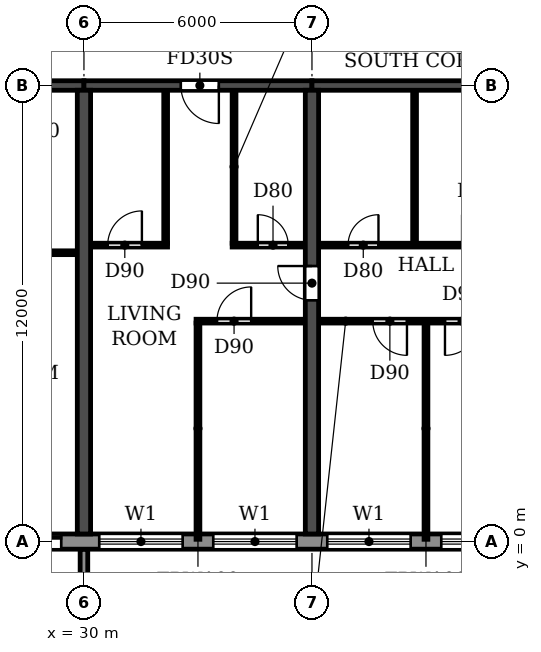
"""IFC4 building model, lengths in metres.
Left out: names, types, materials, properties, quantities, classifications, styles, units other than length and angle.
Written with IfcOpenShell. Run it as: python <this file> out.ifc"""

import sys

from ifc_helpers import new_model, si_unit, direction, frame, frame_2d, origin, place, context, subcontext, project, spatial, polyline, rectangle, outline, extrude, source, transform, mapped, element, fill, save


model = new_model("IFC4")
c1 = context("Model", 3, precision=1e-05, world=origin(), true_north=direction((0.0, 1.0)))
c2 = subcontext(c1, "Body", "Model", "MODEL_VIEW")
j1 = project(units=[si_unit("LENGTHUNIT", "METRE"), si_unit("PLANEANGLEUNIT", "RADIAN")], contexts=[c1])
p1 = place(None, origin())
s1 = spatial("IfcSite", under=j1, at=p1, CompositionType="ELEMENT")
p2 = place(p1, origin())
s2 = spatial("IfcBuilding", under=s1, at=p2, CompositionType="ELEMENT")
p3 = place(p2, frame((0.0, 0.0, 112.5)))
s3 = spatial("IfcBuildingStorey", under=s2, at=p3, CompositionType="ELEMENT", Elevation=112.5)
p4 = place(p3, frame((30.0, 0.2, 0.0), z_axis=(0.0, 0.0, 1.0), x_axis=(0.0, 1.0, 0.0)))
e1 = element("IfcWall", 1, at=p4, inside=s3, PredefinedType="SHEAR", context=c2, shape_type="SweptSolid", body=[
    extrude(rectangle(XDim=11.675, YDim=0.35, at=frame_2d((5.837, 0.0))), origin(), (0.0, 0.0, 1.0), 2.95),
])
p5 = place(p3, frame((36.0, 0.2, 0.0), z_axis=(0.0, 0.0, 1.0), x_axis=(0.0, 1.0, 0.0)))
e2 = element("IfcWall", 2, at=p5, inside=s3, PredefinedType="SHEAR", context=c2, shape_type="SweptSolid", body=[
    extrude(rectangle(XDim=11.675, YDim=0.35, at=frame_2d((5.837, 0.0))), origin(), (0.0, 0.0, 1.0), 2.95),
])
p6 = place(p5, frame((6.15, 0.0, 0.0)))
e3 = element("IfcOpeningElement", 3, at=p6, cuts=e2, PredefinedType="OPENING", context=c2, shape_type="SweptSolid", body=[
    extrude(rectangle(XDim=0.9, YDim=2.1, at=frame_2d((0.45, 1.05))), frame((0.0, 0.185, 0.0), z_axis=(0.0, -1.0, 0.0), x_axis=(1.0, 0.0, 0.0)), (0.0, 0.0, 1.0), 0.37),
])
p7 = place(p3, frame((24.0, 12.0, 0.0), z_axis=(0.0, 0.0, 1.0), x_axis=(1.0, 0.0, 0.0)))
e4 = element("IfcWall", 4, at=p7, inside=s3, PredefinedType="SHEAR", context=c2, shape_type="SweptSolid", body=[
    extrude(rectangle(XDim=6.0, YDim=0.25, at=frame_2d((3.0, 0.0))), origin(), (0.0, 0.0, 1.0), 2.35),
])
p8 = place(p7, frame((2.45, 0.0, 0.0)))
e5 = element("IfcOpeningElement", 5, at=p8, cuts=e4, PredefinedType="OPENING", context=c2, shape_type="SweptSolid", body=[
    extrude(rectangle(XDim=1.0, YDim=2.1, at=frame_2d((0.5, 1.05))), frame((0.0, 0.135, 0.0), z_axis=(0.0, -1.0, 0.0), x_axis=(1.0, 0.0, 0.0)), (0.0, 0.0, 1.0), 0.27),
])
p9 = place(p3, frame((30.0, 12.0, 0.0), z_axis=(0.0, 0.0, 1.0), x_axis=(1.0, 0.0, 0.0)))
e6 = element("IfcWall", 6, at=p9, inside=s3, PredefinedType="SHEAR", context=c2, shape_type="SweptSolid", body=[
    extrude(rectangle(XDim=6.0, YDim=0.25, at=frame_2d((3.0, 0.0))), origin(), (0.0, 0.0, 1.0), 2.35),
])
p10 = place(p9, frame((2.55, 0.0, 0.0)))
e7 = element("IfcOpeningElement", 7, at=p10, cuts=e6, PredefinedType="OPENING", context=c2, shape_type="SweptSolid", body=[
    extrude(rectangle(XDim=1.0, YDim=2.1, at=frame_2d((0.5, 1.05))), frame((0.0, 0.135, 0.0), z_axis=(0.0, -1.0, 0.0), x_axis=(1.0, 0.0, 0.0)), (0.0, 0.0, 1.0), 0.27),
])
p11 = place(p3, frame((36.0, 12.0, 0.0), z_axis=(0.0, 0.0, 1.0), x_axis=(1.0, 0.0, 0.0)))
e8 = element("IfcWall", 8, at=p11, inside=s3, PredefinedType="SHEAR", context=c2, shape_type="SweptSolid", body=[
    extrude(rectangle(XDim=6.0, YDim=0.25, at=frame_2d((3.0, 0.0))), origin(), (0.0, 0.0, 1.0), 2.35),
])
p12 = place(p3, frame((16.683, 0.0, 0.0), z_axis=(0.0, 0.0, 1.0), x_axis=(1.0, 0.0, 0.0)))
e9 = element("IfcWall", 9, at=p12, inside=s3, PredefinedType="STANDARD", context=c2, shape_type="SweptSolid", body=[
    extrude(rectangle(XDim=68.634, YDim=0.4, at=frame_2d((34.317, 0.0))), origin(), (0.0, 0.0, 1.0), 2.95),
])
p13 = place(p12, frame((1.717, 0.0, 0.9)))
e10 = element("IfcOpeningElement", 10, at=p13, cuts=e9, PredefinedType="OPENING", context=c2, shape_type="SweptSolid", body=[
    extrude(rectangle(XDim=2.2, YDim=1.5, at=frame_2d((1.1, 0.75))), frame((0.0, 0.21, 0.0), z_axis=(0.0, -1.0, 0.0), x_axis=(1.0, 0.0, 0.0)), (0.0, 0.0, 1.0), 0.42),
])
p14 = place(p12, frame((4.717, 0.0, 0.9)))
e11 = element("IfcOpeningElement", 11, at=p14, cuts=e9, PredefinedType="OPENING", context=c2, shape_type="SweptSolid", body=[
    extrude(rectangle(XDim=2.2, YDim=1.5, at=frame_2d((1.1, 0.75))), frame((0.0, 0.21, 0.0), z_axis=(0.0, -1.0, 0.0), x_axis=(1.0, 0.0, 0.0)), (0.0, 0.0, 1.0), 0.42),
])
p15 = place(p12, frame((7.717, 0.0, 0.9)))
e12 = element("IfcOpeningElement", 12, at=p15, cuts=e9, PredefinedType="OPENING", context=c2, shape_type="SweptSolid", body=[
    extrude(rectangle(XDim=2.2, YDim=1.5, at=frame_2d((1.1, 0.75))), frame((0.0, 0.21, 0.0), z_axis=(0.0, -1.0, 0.0), x_axis=(1.0, 0.0, 0.0)), (0.0, 0.0, 1.0), 0.42),
])
p16 = place(p12, frame((10.917, 0.0, 0.0)))
e13 = element("IfcOpeningElement", 13, at=p16, cuts=e9, PredefinedType="OPENING", context=c2, shape_type="SweptSolid", body=[
    extrude(rectangle(XDim=1.8, YDim=2.4, at=frame_2d((0.9, 1.2))), frame((0.0, 0.21, 0.0), z_axis=(0.0, -1.0, 0.0), x_axis=(1.0, 0.0, 0.0)), (0.0, 0.0, 1.0), 0.42),
])
p17 = place(p12, frame((13.717, 0.0, 0.9)))
e14 = element("IfcOpeningElement", 14, at=p17, cuts=e9, PredefinedType="OPENING", context=c2, shape_type="SweptSolid", body=[
    extrude(rectangle(XDim=2.2, YDim=1.5, at=frame_2d((1.1, 0.75))), frame((0.0, 0.21, 0.0), z_axis=(0.0, -1.0, 0.0), x_axis=(1.0, 0.0, 0.0)), (0.0, 0.0, 1.0), 0.42),
])
p18 = place(p12, frame((16.717, 0.0, 0.9)))
e15 = element("IfcOpeningElement", 15, at=p18, cuts=e9, PredefinedType="OPENING", context=c2, shape_type="SweptSolid", body=[
    extrude(rectangle(XDim=2.2, YDim=1.5, at=frame_2d((1.1, 0.75))), frame((0.0, 0.21, 0.0), z_axis=(0.0, -1.0, 0.0), x_axis=(1.0, 0.0, 0.0)), (0.0, 0.0, 1.0), 0.42),
])
p19 = place(p12, frame((19.717, 0.0, 0.9)))
e16 = element("IfcOpeningElement", 16, at=p19, cuts=e9, PredefinedType="OPENING", context=c2, shape_type="SweptSolid", body=[
    extrude(rectangle(XDim=2.2, YDim=1.5, at=frame_2d((1.1, 0.75))), frame((0.0, 0.21, 0.0), z_axis=(0.0, -1.0, 0.0), x_axis=(1.0, 0.0, 0.0)), (0.0, 0.0, 1.0), 0.42),
])
p20 = place(p12, frame((22.717, 0.0, 0.9)))
e17 = element("IfcOpeningElement", 17, at=p20, cuts=e9, PredefinedType="OPENING", context=c2, shape_type="SweptSolid", body=[
    extrude(rectangle(XDim=2.2, YDim=1.5, at=frame_2d((1.1, 0.75))), frame((0.0, 0.21, 0.0), z_axis=(0.0, -1.0, 0.0), x_axis=(1.0, 0.0, 0.0)), (0.0, 0.0, 1.0), 0.42),
])
p21 = place(p12, frame((25.717, 0.0, 0.9)))
e18 = element("IfcOpeningElement", 18, at=p21, cuts=e9, PredefinedType="OPENING", context=c2, shape_type="SweptSolid", body=[
    extrude(rectangle(XDim=2.2, YDim=1.5, at=frame_2d((1.1, 0.75))), frame((0.0, 0.21, 0.0), z_axis=(0.0, -1.0, 0.0), x_axis=(1.0, 0.0, 0.0)), (0.0, 0.0, 1.0), 0.42),
])
p22 = place(p12, frame((28.717, 0.0, 0.9)))
e19 = element("IfcOpeningElement", 19, at=p22, cuts=e9, PredefinedType="OPENING", context=c2, shape_type="SweptSolid", body=[
    extrude(rectangle(XDim=2.2, YDim=1.5, at=frame_2d((1.1, 0.75))), frame((0.0, 0.21, 0.0), z_axis=(0.0, -1.0, 0.0), x_axis=(1.0, 0.0, 0.0)), (0.0, 0.0, 1.0), 0.42),
])
p23 = place(p12, frame((31.917, 0.0, 0.0)))
e20 = element("IfcOpeningElement", 20, at=p23, cuts=e9, PredefinedType="OPENING", context=c2, shape_type="SweptSolid", body=[
    extrude(rectangle(XDim=1.8, YDim=2.4, at=frame_2d((0.9, 1.2))), frame((0.0, 0.21, 0.0), z_axis=(0.0, -1.0, 0.0), x_axis=(1.0, 0.0, 0.0)), (0.0, 0.0, 1.0), 0.42),
])
p24 = place(p12, frame((34.717, 0.0, 0.9)))
e21 = element("IfcOpeningElement", 21, at=p24, cuts=e9, PredefinedType="OPENING", context=c2, shape_type="SweptSolid", body=[
    extrude(rectangle(XDim=2.2, YDim=1.5, at=frame_2d((1.1, 0.75))), frame((0.0, 0.21, 0.0), z_axis=(0.0, -1.0, 0.0), x_axis=(1.0, 0.0, 0.0)), (0.0, 0.0, 1.0), 0.42),
])
p25 = place(p12, frame((37.717, 0.0, 0.9)))
e22 = element("IfcOpeningElement", 22, at=p25, cuts=e9, PredefinedType="OPENING", context=c2, shape_type="SweptSolid", body=[
    extrude(rectangle(XDim=2.2, YDim=1.5, at=frame_2d((1.1, 0.75))), frame((0.0, 0.21, 0.0), z_axis=(0.0, -1.0, 0.0), x_axis=(1.0, 0.0, 0.0)), (0.0, 0.0, 1.0), 0.42),
])
p26 = place(p12, frame((40.717, 0.0, 0.9)))
e23 = element("IfcOpeningElement", 23, at=p26, cuts=e9, PredefinedType="OPENING", context=c2, shape_type="SweptSolid", body=[
    extrude(rectangle(XDim=2.2, YDim=1.5, at=frame_2d((1.1, 0.75))), frame((0.0, 0.21, 0.0), z_axis=(0.0, -1.0, 0.0), x_axis=(1.0, 0.0, 0.0)), (0.0, 0.0, 1.0), 0.42),
])
p27 = place(p12, frame((43.717, 0.0, 0.9)))
e24 = element("IfcOpeningElement", 24, at=p27, cuts=e9, PredefinedType="OPENING", context=c2, shape_type="SweptSolid", body=[
    extrude(rectangle(XDim=2.2, YDim=1.5, at=frame_2d((1.1, 0.75))), frame((0.0, 0.21, 0.0), z_axis=(0.0, -1.0, 0.0), x_axis=(1.0, 0.0, 0.0)), (0.0, 0.0, 1.0), 0.42),
])
p28 = place(p12, frame((46.917, 0.0, 0.0)))
e25 = element("IfcOpeningElement", 25, at=p28, cuts=e9, PredefinedType="OPENING", context=c2, shape_type="SweptSolid", body=[
    extrude(rectangle(XDim=1.8, YDim=2.4, at=frame_2d((0.9, 1.2))), frame((0.0, 0.21, 0.0), z_axis=(0.0, -1.0, 0.0), x_axis=(1.0, 0.0, 0.0)), (0.0, 0.0, 1.0), 0.42),
])
p29 = place(p12, frame((49.717, 0.0, 0.9)))
e26 = element("IfcOpeningElement", 26, at=p29, cuts=e9, PredefinedType="OPENING", context=c2, shape_type="SweptSolid", body=[
    extrude(rectangle(XDim=2.2, YDim=1.5, at=frame_2d((1.1, 0.75))), frame((0.0, 0.21, 0.0), z_axis=(0.0, -1.0, 0.0), x_axis=(1.0, 0.0, 0.0)), (0.0, 0.0, 1.0), 0.42),
])
p30 = place(p12, frame((52.717, 0.0, 0.9)))
e27 = element("IfcOpeningElement", 27, at=p30, cuts=e9, PredefinedType="OPENING", context=c2, shape_type="SweptSolid", body=[
    extrude(rectangle(XDim=2.2, YDim=1.5, at=frame_2d((1.1, 0.75))), frame((0.0, 0.21, 0.0), z_axis=(0.0, -1.0, 0.0), x_axis=(1.0, 0.0, 0.0)), (0.0, 0.0, 1.0), 0.42),
])
p31 = place(p12, frame((55.717, 0.0, 0.9)))
e28 = element("IfcOpeningElement", 28, at=p31, cuts=e9, PredefinedType="OPENING", context=c2, shape_type="SweptSolid", body=[
    extrude(rectangle(XDim=2.2, YDim=1.5, at=frame_2d((1.1, 0.75))), frame((0.0, 0.21, 0.0), z_axis=(0.0, -1.0, 0.0), x_axis=(1.0, 0.0, 0.0)), (0.0, 0.0, 1.0), 0.42),
])
p32 = place(p12, frame((58.717, 0.0, 0.9)))
e29 = element("IfcOpeningElement", 29, at=p32, cuts=e9, PredefinedType="OPENING", context=c2, shape_type="SweptSolid", body=[
    extrude(rectangle(XDim=2.2, YDim=1.5, at=frame_2d((1.1, 0.75))), frame((0.0, 0.21, 0.0), z_axis=(0.0, -1.0, 0.0), x_axis=(1.0, 0.0, 0.0)), (0.0, 0.0, 1.0), 0.42),
])
p33 = place(p12, frame((61.717, 0.0, 0.9)))
e30 = element("IfcOpeningElement", 30, at=p33, cuts=e9, PredefinedType="OPENING", context=c2, shape_type="SweptSolid", body=[
    extrude(rectangle(XDim=2.2, YDim=1.5, at=frame_2d((1.1, 0.75))), frame((0.0, 0.21, 0.0), z_axis=(0.0, -1.0, 0.0), x_axis=(1.0, 0.0, 0.0)), (0.0, 0.0, 1.0), 0.42),
])
p34 = place(p12, frame((64.717, 0.0, 0.9)))
e31 = element("IfcOpeningElement", 31, at=p34, cuts=e9, PredefinedType="OPENING", context=c2, shape_type="SweptSolid", body=[
    extrude(rectangle(XDim=2.2, YDim=1.5, at=frame_2d((1.1, 0.75))), frame((0.0, 0.21, 0.0), z_axis=(0.0, -1.0, 0.0), x_axis=(1.0, 0.0, 0.0)), (0.0, 0.0, 1.0), 0.42),
])
m1 = source(origin(), c2, "Body", "SweptSolid", [
    extrude(outline(polyline([(0.0, 0.0), (0.2, 0.0), (0.2, 1.65), (0.0, 1.65), (0.0, 0.0)])), origin(), (0.0, 0.0, 1.0), 3.1),
])
p35 = place(p3, frame((29.9, -1.85, 0.0)))
e32 = element("IfcWall", 32, at=p35, inside=s3, PredefinedType="STANDARD", context=c2, shape_type="MappedRepresentation", body=[
    mapped(m1, transform((0.0, 0.0, 0.0))),
])
p36 = place(p3, frame((32.95, 5.8, 0.0), z_axis=(0.0, 0.0, 1.0), x_axis=(1.0, 0.0, 0.0)))
e33 = element("IfcWall", 33, at=p36, inside=s3, PredefinedType="PARTITIONING", context=c2, shape_type="SweptSolid", body=[
    extrude(rectangle(XDim=2.865, YDim=0.1, at=frame_2d((1.433, 0.0))), origin(), (0.0, 0.0, 1.0), 2.95),
])
p37 = place(p36, frame((0.55, 0.0, 0.0)))
e34 = element("IfcOpeningElement", 34, at=p37, cuts=e33, PredefinedType="OPENING", context=c2, shape_type="SweptSolid", body=[
    extrude(rectangle(XDim=0.9, YDim=2.1, at=frame_2d((0.45, 1.05))), frame((0.0, 0.06, 0.0), z_axis=(0.0, -1.0, 0.0), x_axis=(1.0, 0.0, 0.0)), (0.0, 0.0, 1.0), 0.12),
])
p38 = place(p3, frame((36.185, 5.8, 0.0), z_axis=(0.0, 0.0, 1.0), x_axis=(1.0, 0.0, 0.0)))
e35 = element("IfcWall", 35, at=p38, inside=s3, PredefinedType="PARTITIONING", context=c2, shape_type="SweptSolid", body=[
    extrude(rectangle(XDim=5.63, YDim=0.1, at=frame_2d((2.815, 0.0))), origin(), (0.0, 0.0, 1.0), 2.95),
])
p39 = place(p38, frame((1.415, 0.0, 0.0)))
e36 = element("IfcOpeningElement", 36, at=p39, cuts=e35, PredefinedType="OPENING", context=c2, shape_type="SweptSolid", body=[
    extrude(rectangle(XDim=0.9, YDim=2.1, at=frame_2d((0.45, 1.05))), frame((0.0, 0.06, 0.0), z_axis=(0.0, -1.0, 0.0), x_axis=(1.0, 0.0, 0.0)), (0.0, 0.0, 1.0), 0.12),
])
p40 = place(p38, frame((3.315, 0.0, 0.0)))
e37 = element("IfcOpeningElement", 37, at=p40, cuts=e35, PredefinedType="OPENING", context=c2, shape_type="SweptSolid", body=[
    extrude(rectangle(XDim=0.9, YDim=2.1, at=frame_2d((0.45, 1.05))), frame((0.0, 0.06, 0.0), z_axis=(0.0, -1.0, 0.0), x_axis=(1.0, 0.0, 0.0)), (0.0, 0.0, 1.0), 0.12),
])
p41 = place(p3, frame((27.8, 7.6, 0.0), z_axis=(0.0, 0.0, 1.0), x_axis=(1.0, 0.0, 0.0)))
e38 = element("IfcWall", 38, at=p41, inside=s3, PredefinedType="PARTITIONING", context=c2, shape_type="SweptSolid", body=[
    extrude(rectangle(XDim=2.015, YDim=0.1, at=frame_2d((1.007, 0.0))), origin(), (0.0, 0.0, 1.0), 2.95),
])
p42 = place(p3, frame((30.185, 7.8, 0.0), z_axis=(0.0, 0.0, 1.0), x_axis=(1.0, 0.0, 0.0)))
e39 = element("IfcWall", 39, at=p42, inside=s3, PredefinedType="PARTITIONING", context=c2, shape_type="SweptSolid", body=[
    extrude(rectangle(XDim=2.015, YDim=0.1, at=frame_2d((1.007, 0.0))), origin(), (0.0, 0.0, 1.0), 2.95),
])
p43 = place(p42, frame((0.44, 0.0, 0.0)))
e40 = element("IfcOpeningElement", 40, at=p43, cuts=e39, PredefinedType="OPENING", context=c2, shape_type="SweptSolid", body=[
    extrude(rectangle(XDim=0.9, YDim=2.1, at=frame_2d((0.45, 1.05))), frame((0.0, 0.06, 0.0), z_axis=(0.0, -1.0, 0.0), x_axis=(1.0, 0.0, 0.0)), (0.0, 0.0, 1.0), 0.12),
])
p44 = place(p3, frame((33.9, 7.8, 0.0), z_axis=(0.0, 0.0, 1.0), x_axis=(1.0, 0.0, 0.0)))
e41 = element("IfcWall", 41, at=p44, inside=s3, PredefinedType="PARTITIONING", context=c2, shape_type="SweptSolid", body=[
    extrude(rectangle(XDim=1.915, YDim=0.1, at=frame_2d((0.958, 0.0))), origin(), (0.0, 0.0, 1.0), 2.95),
])
p45 = place(p44, frame((0.675, 0.0, 0.0)))
e42 = element("IfcOpeningElement", 42, at=p45, cuts=e41, PredefinedType="OPENING", context=c2, shape_type="SweptSolid", body=[
    extrude(rectangle(XDim=0.8, YDim=2.1, at=frame_2d((0.4, 1.05))), frame((0.0, 0.06, 0.0), z_axis=(0.0, -1.0, 0.0), x_axis=(1.0, 0.0, 0.0)), (0.0, 0.0, 1.0), 0.12),
])
p46 = place(p3, frame((36.185, 7.8, 0.0), z_axis=(0.0, 0.0, 1.0), x_axis=(1.0, 0.0, 0.0)))
e43 = element("IfcWall", 43, at=p46, inside=s3, PredefinedType="PARTITIONING", context=c2, shape_type="SweptSolid", body=[
    extrude(rectangle(XDim=5.63, YDim=0.1, at=frame_2d((2.815, 0.0))), origin(), (0.0, 0.0, 1.0), 2.95),
])
p47 = place(p46, frame((0.765, 0.0, 0.0)))
e44 = element("IfcOpeningElement", 44, at=p47, cuts=e43, PredefinedType="OPENING", context=c2, shape_type="SweptSolid", body=[
    extrude(rectangle(XDim=0.8, YDim=2.1, at=frame_2d((0.4, 1.05))), frame((0.0, 0.06, 0.0), z_axis=(0.0, -1.0, 0.0), x_axis=(1.0, 0.0, 0.0)), (0.0, 0.0, 1.0), 0.12),
])
p48 = place(p46, frame((3.765, 0.0, 0.0)))
e45 = element("IfcOpeningElement", 45, at=p48, cuts=e43, PredefinedType="OPENING", context=c2, shape_type="SweptSolid", body=[
    extrude(rectangle(XDim=0.8, YDim=2.1, at=frame_2d((0.4, 1.05))), frame((0.0, 0.06, 0.0), z_axis=(0.0, -1.0, 0.0), x_axis=(1.0, 0.0, 0.0)), (0.0, 0.0, 1.0), 0.12),
])
p49 = place(p3, frame((32.15, 7.85, 0.0), z_axis=(0.0, 0.0, 1.0), x_axis=(0.0, 1.0, 0.0)))
e46 = element("IfcWall", 46, at=p49, inside=s3, PredefinedType="PARTITIONING", context=c2, shape_type="SweptSolid", body=[
    extrude(rectangle(XDim=4.015, YDim=0.1, at=frame_2d((2.007, 0.0))), origin(), (0.0, 0.0, 1.0), 2.95),
])
p50 = place(p3, frame((33.0, 0.06, 0.0), z_axis=(0.0, 0.0, 1.0), x_axis=(0.0, 1.0, 0.0)))
e47 = element("IfcWall", 47, at=p50, inside=s3, PredefinedType="PARTITIONING", context=c2, shape_type="SweptSolid", body=[
    extrude(rectangle(XDim=5.69, YDim=0.1, at=frame_2d((2.845, 0.0))), origin(), (0.0, 0.0, 1.0), 2.95),
])
for number, where, z_axis, x_axis in (
    (48, (33.95, 7.85, 0.0), (0.0, 0.0, 1.0), (0.0, 1.0, 0.0)),
    (49, (38.7, 7.85, 0.0), (0.0, 0.0, 1.0), (0.0, 1.0, 0.0)),
):
    element("IfcWall", number, at=place(p3, frame(where, z_axis=z_axis, x_axis=x_axis)), inside=s3, PredefinedType="PARTITIONING", context=c2, shape_type="SweptSolid", body=[
        extrude(rectangle(XDim=4.015, YDim=0.1, at=frame_2d((2.007, 0.0))), origin(), (0.0, 0.0, 1.0), 2.95),
    ])
p51 = place(p3, frame((39.0, 0.06, 0.0), z_axis=(0.0, 0.0, 1.0), x_axis=(0.0, 1.0, 0.0)))
e50 = element("IfcWall", 50, at=p51, inside=s3, PredefinedType="PARTITIONING", context=c2, shape_type="SweptSolid", body=[
    extrude(rectangle(XDim=5.69, YDim=0.1, at=frame_2d((2.845, 0.0))), origin(), (0.0, 0.0, 1.0), 2.95),
])
p52 = place(p16, origin())
e51 = element("IfcDoor", 51, at=p52, inside=s3, OperationType="DOUBLE_DOOR_SLIDING", PredefinedType="DOOR", context=c2, shape_type="SweptSolid", body=[
    extrude(rectangle(XDim=1.8, YDim=2.4, at=frame_2d((0.9, 1.2))), frame((0.0, 0.025, 0.0), z_axis=(0.0, -1.0, 0.0), x_axis=(1.0, 0.0, 0.0)), (0.0, 0.0, 1.0), 0.05),
])
fill(e13, e51)
p53 = place(p17, origin())
e52 = element("IfcWindow", 52, at=p53, inside=s3, PartitioningType="DOUBLE_PANEL_HORIZONTAL", PredefinedType="WINDOW", context=c2, shape_type="SweptSolid", body=[
    extrude(rectangle(XDim=2.2, YDim=1.5, at=frame_2d((1.1, 0.75))), frame((0.0, 0.03, 0.0), z_axis=(0.0, -1.0, 0.0), x_axis=(1.0, 0.0, 0.0)), (0.0, 0.0, 1.0), 0.06),
])
fill(e14, e52)
p54 = place(p18, origin())
e53 = element("IfcWindow", 53, at=p54, inside=s3, PartitioningType="DOUBLE_PANEL_HORIZONTAL", PredefinedType="WINDOW", context=c2, shape_type="SweptSolid", body=[
    extrude(rectangle(XDim=2.2, YDim=1.5, at=frame_2d((1.1, 0.75))), frame((0.0, 0.03, 0.0), z_axis=(0.0, -1.0, 0.0), x_axis=(1.0, 0.0, 0.0)), (0.0, 0.0, 1.0), 0.06),
])
fill(e15, e53)
p55 = place(p19, origin())
e54 = element("IfcWindow", 54, at=p55, inside=s3, PartitioningType="DOUBLE_PANEL_HORIZONTAL", PredefinedType="WINDOW", context=c2, shape_type="SweptSolid", body=[
    extrude(rectangle(XDim=2.2, YDim=1.5, at=frame_2d((1.1, 0.75))), frame((0.0, 0.03, 0.0), z_axis=(0.0, -1.0, 0.0), x_axis=(1.0, 0.0, 0.0)), (0.0, 0.0, 1.0), 0.06),
])
fill(e16, e54)
p56 = place(p20, origin())
e55 = element("IfcWindow", 55, at=p56, inside=s3, PartitioningType="DOUBLE_PANEL_HORIZONTAL", PredefinedType="WINDOW", context=c2, shape_type="SweptSolid", body=[
    extrude(rectangle(XDim=2.2, YDim=1.5, at=frame_2d((1.1, 0.75))), frame((0.0, 0.03, 0.0), z_axis=(0.0, -1.0, 0.0), x_axis=(1.0, 0.0, 0.0)), (0.0, 0.0, 1.0), 0.06),
])
fill(e17, e55)
p57 = place(p47, origin())
e56 = element("IfcDoor", 56, at=p57, inside=s3, OperationType="SINGLE_SWING_RIGHT", PredefinedType="DOOR", context=c2, shape_type="SweptSolid", body=[
    extrude(rectangle(XDim=0.8, YDim=2.1, at=frame_2d((0.4, 1.05))), frame((0.0, 0.025, 0.0), z_axis=(0.0, -1.0, 0.0), x_axis=(1.0, 0.0, 0.0)), (0.0, 0.0, 1.0), 0.05),
])
fill(e44, e56)
p58 = place(p39, frame((0.9, 0.0, 0.0), z_axis=(0.0, 0.0, 1.0), x_axis=(-1.0, 0.0, 0.0)))
e57 = element("IfcDoor", 57, at=p58, inside=s3, OperationType="SINGLE_SWING_LEFT", PredefinedType="DOOR", context=c2, shape_type="SweptSolid", body=[
    extrude(rectangle(XDim=0.9, YDim=2.1, at=frame_2d((0.45, 1.05))), frame((0.0, 0.025, 0.0), z_axis=(0.0, -1.0, 0.0), x_axis=(1.0, 0.0, 0.0)), (0.0, 0.0, 1.0), 0.05),
])
fill(e36, e57)
p59 = place(p40, frame((0.9, 0.0, 0.0), z_axis=(0.0, 0.0, 1.0), x_axis=(-1.0, 0.0, 0.0)))
e58 = element("IfcDoor", 58, at=p59, inside=s3, OperationType="SINGLE_SWING_RIGHT", PredefinedType="DOOR", context=c2, shape_type="SweptSolid", body=[
    extrude(rectangle(XDim=0.9, YDim=2.1, at=frame_2d((0.45, 1.05))), frame((0.0, 0.025, 0.0), z_axis=(0.0, -1.0, 0.0), x_axis=(1.0, 0.0, 0.0)), (0.0, 0.0, 1.0), 0.05),
])
fill(e37, e58)
p60 = place(p48, origin())
e59 = element("IfcDoor", 59, at=p60, inside=s3, OperationType="SINGLE_SWING_LEFT", PredefinedType="DOOR", context=c2, shape_type="SweptSolid", body=[
    extrude(rectangle(XDim=0.8, YDim=2.1, at=frame_2d((0.4, 1.05))), frame((0.0, 0.025, 0.0), z_axis=(0.0, -1.0, 0.0), x_axis=(1.0, 0.0, 0.0)), (0.0, 0.0, 1.0), 0.05),
])
fill(e45, e59)
p61 = place(p43, origin())
e60 = element("IfcDoor", 60, at=p61, inside=s3, OperationType="SINGLE_SWING_RIGHT", PredefinedType="DOOR", context=c2, shape_type="SweptSolid", body=[
    extrude(rectangle(XDim=0.9, YDim=2.1, at=frame_2d((0.45, 1.05))), frame((0.0, 0.025, 0.0), z_axis=(0.0, -1.0, 0.0), x_axis=(1.0, 0.0, 0.0)), (0.0, 0.0, 1.0), 0.05),
])
fill(e40, e60)
p62 = place(p10, frame((1.0, 0.0, 0.0), z_axis=(0.0, 0.0, 1.0), x_axis=(-1.0, 0.0, 0.0)))
e61 = element("IfcDoor", 61, at=p62, inside=s3, OperationType="SINGLE_SWING_LEFT", PredefinedType="DOOR", context=c2, shape_type="SweptSolid", body=[
    extrude(rectangle(XDim=1.0, YDim=2.1, at=frame_2d((0.5, 1.05))), frame((0.0, 0.025, 0.0), z_axis=(0.0, -1.0, 0.0), x_axis=(1.0, 0.0, 0.0)), (0.0, 0.0, 1.0), 0.05),
])
fill(e7, e61)
p63 = place(p37, origin())
e62 = element("IfcDoor", 62, at=p63, inside=s3, OperationType="SINGLE_SWING_RIGHT", PredefinedType="DOOR", context=c2, shape_type="SweptSolid", body=[
    extrude(rectangle(XDim=0.9, YDim=2.1, at=frame_2d((0.45, 1.05))), frame((0.0, 0.025, 0.0), z_axis=(0.0, -1.0, 0.0), x_axis=(1.0, 0.0, 0.0)), (0.0, 0.0, 1.0), 0.05),
])
fill(e34, e62)
p64 = place(p45, origin())
e63 = element("IfcDoor", 63, at=p64, inside=s3, OperationType="SINGLE_SWING_LEFT", PredefinedType="DOOR", context=c2, shape_type="SweptSolid", body=[
    extrude(rectangle(XDim=0.8, YDim=2.1, at=frame_2d((0.4, 1.05))), frame((0.0, 0.025, 0.0), z_axis=(0.0, -1.0, 0.0), x_axis=(1.0, 0.0, 0.0)), (0.0, 0.0, 1.0), 0.05),
])
fill(e42, e63)
p65 = place(p6, origin())
e64 = element("IfcDoor", 64, at=p65, inside=s3, OperationType="SINGLE_SWING_RIGHT", PredefinedType="DOOR", context=c2, shape_type="SweptSolid", body=[
    extrude(rectangle(XDim=0.9, YDim=2.1, at=frame_2d((0.45, 1.05))), frame((0.0, 0.025, 0.0), z_axis=(0.0, -1.0, 0.0), x_axis=(1.0, 0.0, 0.0)), (0.0, 0.0, 1.0), 0.05),
])
fill(e3, e64)
save(model, sys.argv[1])
